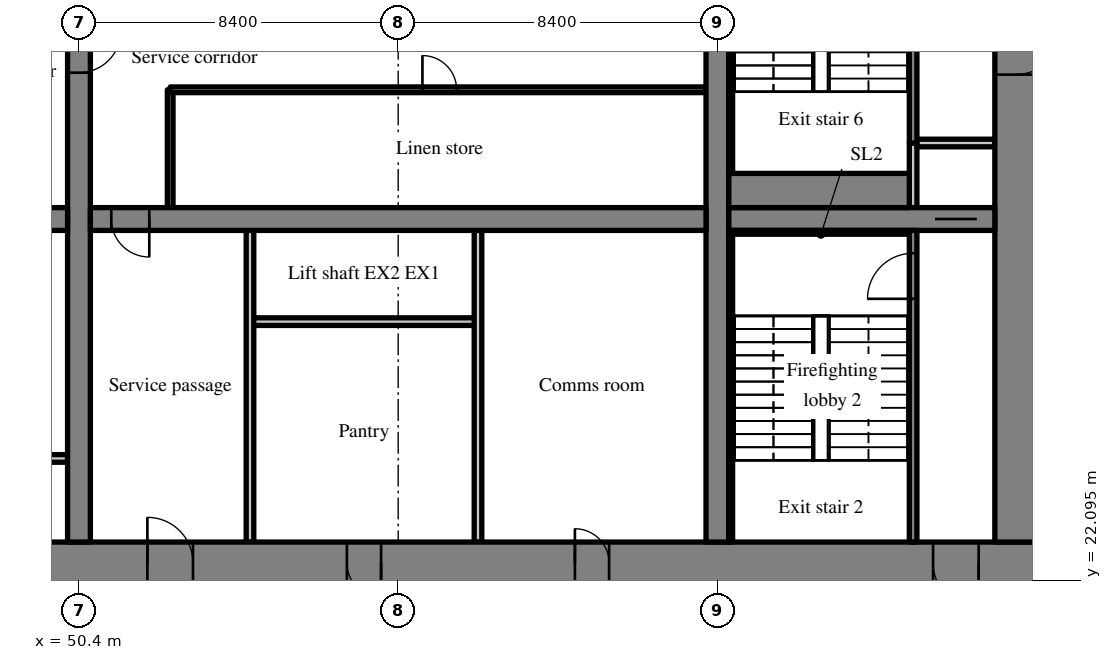
"""IFC4 building model, lengths in metres.
Left out: names, types, materials, properties, quantities, classifications, styles, units other than length and angle.
Written with IfcOpenShell. Run it as: python <this file> out.ifc"""

import sys

from ifc_helpers import new_model, si_unit, direction, frame, frame_2d, origin, place, context, subcontext, project, spatial, rectangle, extrude, source, transform, mapped, element, fill, save


model = new_model("IFC4")
c1 = context("Model", 3, precision=1e-05, world=origin(), true_north=direction((0.0, 1.0)))
c2 = subcontext(c1, "Body", "Model", "MODEL_VIEW")
j1 = project(units=[si_unit("LENGTHUNIT", "METRE"), si_unit("PLANEANGLEUNIT", "RADIAN")], contexts=[c1])
p1 = place(None, origin())
s1 = spatial("IfcSite", under=j1, at=p1, CompositionType="ELEMENT")
p2 = place(p1, origin())
s2 = spatial("IfcBuilding", under=s1, at=p2, CompositionType="ELEMENT")
p3 = place(p2, frame((0.0, 0.0, 31.6)))
s3 = spatial("IfcBuildingStorey", under=s2, at=p3, CompositionType="ELEMENT", Elevation=31.6)
m1 = source(origin(), c2, "Body", "SweptSolid", [
    extrude(rectangle(XDim=50.4, YDim=1.1, at=frame_2d((25.2, 0.0))), origin(), (0.0, 0.0, 1.0), 3.52),
])
p4 = place(p3, frame((25.2, 22.55, 0.0), z_axis=(0.0, 0.0, 1.0), x_axis=(1.0, 0.0, 0.0)))
e1 = element("IfcWall", 1, at=p4, inside=s3, PredefinedType="SHEAR", context=c2, shape_type="MappedRepresentation", body=[
    mapped(m1, transform((0.0, 0.0, 0.0), scale=1.0)),
])
m2 = source(origin(), c2, "Body", "SweptSolid", [
    extrude(rectangle(XDim=1.8, YDim=2.1, at=frame_2d((0.9, 1.05))), frame((0.0, 0.56, 0.0), z_axis=(0.0, -1.0, 0.0), x_axis=(1.0, 0.0, 0.0)), (0.0, 0.0, 1.0), 1.12),
])
p5 = place(p4, frame((15.9, 0.0, 0.0)))
e2 = element("IfcOpeningElement", 2, at=p5, cuts=e1, PredefinedType="OPENING", context=c2, shape_type="MappedRepresentation", body=[
    mapped(m2, transform((0.0, 0.0, 0.0), scale=1.0)),
])
m3 = source(origin(), c2, "Body", "SweptSolid", [
    extrude(rectangle(XDim=1.2, YDim=2.1, at=frame_2d((0.6, 1.05))), frame((0.0, 0.56, 0.0), z_axis=(0.0, -1.0, 0.0), x_axis=(1.0, 0.0, 0.0)), (0.0, 0.0, 1.0), 1.12),
])
p6 = place(p4, frame((27.0, 0.0, 0.0)))
e3 = element("IfcOpeningElement", 3, at=p6, cuts=e1, PredefinedType="OPENING", context=c2, shape_type="MappedRepresentation", body=[
    mapped(m3, transform((0.0, 0.0, 0.0), scale=1.0)),
])
m4 = source(origin(), c2, "Body", "SweptSolid", [
    extrude(rectangle(XDim=0.9, YDim=2.1, at=frame_2d((0.45, 1.05))), frame((0.0, 0.56, 0.0), z_axis=(0.0, -1.0, 0.0), x_axis=(1.0, 0.0, 0.0)), (0.0, 0.0, 1.0), 1.12),
])
p7 = place(p4, frame((32.25, 0.0, 0.0)))
e4 = element("IfcOpeningElement", 4, at=p7, cuts=e1, PredefinedType="OPENING", context=c2, shape_type="MappedRepresentation", body=[
    mapped(m4, transform((0.0, 0.0, 0.0), scale=1.0)),
])
p8 = place(p4, frame((38.25, 0.0, 0.0)))
e5 = element("IfcOpeningElement", 5, at=p8, cuts=e1, PredefinedType="OPENING", context=c2, shape_type="MappedRepresentation", body=[
    mapped(m4, transform((0.0, 0.0, 0.0), scale=1.0)),
])
p9 = place(p4, frame((6.425, 0.0, 0.0)))
e6 = element("IfcOpeningElement", 6, at=p9, cuts=e1, PredefinedType="OPENING", context=c2, shape_type="MappedRepresentation", body=[
    mapped(m3, transform((0.0, 0.0, 0.0), scale=1.0)),
])
p10 = place(p4, frame((47.675, 0.0, 0.0)))
e7 = element("IfcOpeningElement", 7, at=p10, cuts=e1, PredefinedType="OPENING", context=c2, shape_type="MappedRepresentation", body=[
    mapped(m3, transform((0.0, 0.0, 0.0), scale=1.0)),
])
m5 = source(origin(), c2, "Body", "SweptSolid", [
    extrude(rectangle(XDim=17.8, YDim=1.1, at=frame_2d((8.9, 0.0))), origin(), (0.0, 0.0, 1.0), 3.52),
])
p11 = place(p3, frame((75.05, 23.1, 0.0), z_axis=(0.0, 0.0, 1.0), x_axis=(0.0, 1.0, 0.0)))
e8 = element("IfcWall", 8, at=p11, inside=s3, PredefinedType="SHEAR", context=c2, shape_type="MappedRepresentation", body=[
    mapped(m5, transform((0.0, 0.0, 0.0), scale=1.0)),
])
p12 = place(p11, frame((12.3, 0.0, 0.0)))
e9 = element("IfcOpeningElement", 9, at=p12, cuts=e8, PredefinedType="OPENING", context=c2, shape_type="MappedRepresentation", body=[
    mapped(m3, transform((0.0, 0.0, 0.0), scale=1.0)),
])
m6 = source(origin(), c2, "Body", "SweptSolid", [
    extrude(rectangle(XDim=17.8, YDim=0.6, at=frame_2d((8.9, 0.0))), origin(), (0.0, 0.0, 1.0), 3.52),
])
p13 = place(p3, frame((50.4, 23.1, 0.0), z_axis=(0.0, 0.0, 1.0), x_axis=(0.0, 1.0, 0.0)))
e10 = element("IfcWall", 10, at=p13, inside=s3, PredefinedType="SHEAR", context=c2, shape_type="MappedRepresentation", body=[
    mapped(m6, transform((0.0, 0.0, 0.0), scale=1.0)),
])
m7 = source(origin(), c2, "Body", "SweptSolid", [
    extrude(rectangle(XDim=1.1, YDim=2.1, at=frame_2d((0.55, 1.05))), frame((0.0, 0.31, 0.0), z_axis=(0.0, -1.0, 0.0), x_axis=(1.0, 0.0, 0.0)), (0.0, 0.0, 1.0), 0.62),
])
p14 = place(p13, frame((12.35, 0.0, 0.0)))
e11 = element("IfcOpeningElement", 11, at=p14, cuts=e10, PredefinedType="OPENING", context=c2, shape_type="MappedRepresentation", body=[
    mapped(m7, transform((0.0, 0.0, 0.0), scale=1.0)),
])
p15 = place(p3, frame((67.2, 23.1, 0.0), z_axis=(0.0, 0.0, 1.0), x_axis=(0.0, 1.0, 0.0)))
e12 = element("IfcWall", 12, at=p15, inside=s3, PredefinedType="SHEAR", context=c2, shape_type="MappedRepresentation", body=[
    mapped(m6, transform((0.0, 0.0, 0.0), scale=1.0)),
])
m8 = source(origin(), c2, "Body", "SweptSolid", [
    extrude(rectangle(XDim=16.2, YDim=0.6, at=frame_2d((8.1, 0.0))), origin(), (0.0, 0.0, 1.0), 3.52),
])
p16 = place(p3, frame((33.9, 31.6, 0.0), z_axis=(0.0, 0.0, 1.0), x_axis=(1.0, 0.0, 0.0)))
e13 = element("IfcWall", 13, at=p16, inside=s3, PredefinedType="SHEAR", context=c2, shape_type="MappedRepresentation", body=[
    mapped(m8, transform((0.0, 0.0, 0.0), scale=1.0)),
])
m9 = source(origin(), c2, "Body", "SweptSolid", [
    extrude(rectangle(XDim=1.0, YDim=2.1, at=frame_2d((0.5, 1.05))), frame((0.0, 0.31, 0.0), z_axis=(0.0, -1.0, 0.0), x_axis=(1.0, 0.0, 0.0)), (0.0, 0.0, 1.0), 0.62),
])
p17 = place(p16, frame((14.65, 0.0, 0.0)))
e14 = element("IfcOpeningElement", 14, at=p17, cuts=e13, PredefinedType="OPENING", context=c2, shape_type="MappedRepresentation", body=[
    mapped(m9, transform((0.0, 0.0, 0.0), scale=1.0)),
])
m10 = source(origin(), c2, "Body", "SweptSolid", [
    extrude(rectangle(XDim=16.2, YDim=0.6, at=frame_2d((8.1, 0.0))), origin(), (0.0, 0.0, 1.0), 3.52),
])
p18 = place(p3, frame((50.7, 31.6, 0.0), z_axis=(0.0, 0.0, 1.0), x_axis=(1.0, 0.0, 0.0)))
e15 = element("IfcWall", 15, at=p18, inside=s3, PredefinedType="SHEAR", context=c2, shape_type="MappedRepresentation", body=[
    mapped(m10, transform((0.0, 0.0, 0.0), scale=1.0)),
])
p19 = place(p18, frame((0.55, 0.0, 0.0)))
e16 = element("IfcOpeningElement", 16, at=p19, cuts=e15, PredefinedType="OPENING", context=c2, shape_type="MappedRepresentation", body=[
    mapped(m9, transform((0.0, 0.0, 0.0), scale=1.0)),
])
m11 = source(origin(), c2, "Body", "SweptSolid", [
    extrude(rectangle(XDim=7.0, YDim=0.6, at=frame_2d((3.5, 0.0))), origin(), (0.0, 0.0, 1.0), 3.52),
])
p20 = place(p3, frame((67.5, 31.6, 0.0), z_axis=(0.0, 0.0, 1.0), x_axis=(1.0, 0.0, 0.0)))
e17 = element("IfcWall", 17, at=p20, inside=s3, PredefinedType="SHEAR", context=c2, shape_type="MappedRepresentation", body=[
    mapped(m11, transform((0.0, 0.0, 0.0), scale=1.0)),
])
p21 = place(p20, frame((5.425, 0.0, 0.0)))
e18 = element("IfcOpeningElement", 18, at=p21, cuts=e17, PredefinedType="OPENING", context=c2, shape_type="MappedRepresentation", body=[
    mapped(m7, transform((0.0, 0.0, 0.0), scale=1.0)),
])
m12 = source(origin(), c2, "Body", "SweptSolid", [
    extrude(rectangle(XDim=6.0, YDim=0.2, at=frame_2d((3.0, 0.0))), origin(), (0.0, 0.0, 1.0), 3.52),
])
p22 = place(p3, frame((44.1, 25.3, 0.0), z_axis=(0.0, 0.0, 1.0), x_axis=(1.0, 0.0, 0.0)))
e19 = element("IfcWall", 19, at=p22, inside=s3, PredefinedType="SOLIDWALL", context=c2, shape_type="MappedRepresentation", body=[
    mapped(m12, transform((0.0, 0.0, 0.0), scale=1.0)),
])
m13 = source(origin(), c2, "Body", "SweptSolid", [
    extrude(rectangle(XDim=1.1, YDim=2.1, at=frame_2d((0.55, 1.05))), frame((0.0, 0.11, 0.0), z_axis=(0.0, -1.0, 0.0), x_axis=(1.0, 0.0, 0.0)), (0.0, 0.0, 1.0), 0.22),
])
p23 = place(p22, frame((0.95, 0.0, 0.0)))
e20 = element("IfcOpeningElement", 20, at=p23, cuts=e19, PredefinedType="OPENING", context=c2, shape_type="MappedRepresentation", body=[
    mapped(m13, transform((0.0, 0.0, 0.0), scale=1.0)),
])
p24 = place(p22, frame((3.95, 0.0, 0.0)))
e21 = element("IfcOpeningElement", 21, at=p24, cuts=e19, PredefinedType="OPENING", context=c2, shape_type="MappedRepresentation", body=[
    mapped(m13, transform((0.0, 0.0, 0.0), scale=1.0)),
])
p25 = place(p3, frame((60.9, 28.9, 0.0), z_axis=(0.0, 0.0, 1.0), x_axis=(-1.0, 0.0, 0.0)))
e22 = element("IfcWall", 22, at=p25, inside=s3, PredefinedType="SOLIDWALL", context=c2, shape_type="MappedRepresentation", body=[
    mapped(m12, transform((0.0, 0.0, 0.0), scale=1.0)),
])
m14 = source(origin(), c2, "Body", "SweptSolid", [
    extrude(rectangle(XDim=8.2, YDim=0.2, at=frame_2d((4.1, 0.0))), origin(), (0.0, 0.0, 1.0), 3.52),
])
for number, where, z_axis, x_axis in (
    (23, (54.9, 23.1, 0.0), (0.0, 0.0, 1.0), (0.0, 1.0, 0.0)),
    (24, (60.9, 23.1, 0.0), (0.0, 0.0, 1.0), (0.0, 1.0, 0.0)),
):
    element("IfcWall", number, at=place(p3, frame(where, z_axis=z_axis, x_axis=x_axis)), inside=s3, PredefinedType="PARTITIONING", context=c2, shape_type="MappedRepresentation", body=[
        mapped(m14, transform((0.0, 0.0, 0.0), scale=1.0)),
    ])
m15 = source(origin(), c2, "Body", "SweptSolid", [
    extrude(rectangle(XDim=3.1, YDim=0.15, at=frame_2d((1.55, 0.0))), origin(), (0.0, 0.0, 1.0), 3.52),
])
p26 = place(p3, frame((52.8, 31.9, 0.0), z_axis=(0.0, 0.0, 1.0), x_axis=(0.0, 1.0, 0.0)))
e25 = element("IfcWall", 25, at=p26, inside=s3, PredefinedType="PARTITIONING", context=c2, shape_type="MappedRepresentation", body=[
    mapped(m15, transform((0.0, 0.0, 0.0), scale=1.0)),
])
m16 = source(origin(), c2, "Body", "SweptSolid", [
    extrude(rectangle(XDim=14.1, YDim=0.15, at=frame_2d((7.05, 0.0))), origin(), (0.0, 0.0, 1.0), 3.52),
])
p27 = place(p3, frame((66.9, 35.0, 0.0), z_axis=(0.0, 0.0, 1.0), x_axis=(-1.0, 0.0, 0.0)))
e26 = element("IfcWall", 26, at=p27, inside=s3, PredefinedType="PARTITIONING", context=c2, shape_type="MappedRepresentation", body=[
    mapped(m16, transform((0.0, 0.0, 0.0), scale=1.0)),
])
m17 = source(origin(), c2, "Body", "SweptSolid", [
    extrude(rectangle(XDim=0.9, YDim=2.1, at=frame_2d((0.45, 1.05))), frame((0.0, 0.085, 0.0), z_axis=(0.0, -1.0, 0.0), x_axis=(1.0, 0.0, 0.0)), (0.0, 0.0, 1.0), 0.17),
])
p28 = place(p27, frame((6.562, 0.0, 0.0)))
e27 = element("IfcOpeningElement", 27, at=p28, cuts=e26, PredefinedType="OPENING", context=c2, shape_type="MappedRepresentation", body=[
    mapped(m17, transform((0.0, 0.0, 0.0), scale=1.0)),
])
m18 = source(origin(), c2, "Body", "SweptSolid", [
    extrude(rectangle(XDim=8.2, YDim=0.2, at=frame_2d((4.1, 0.0))), origin(), (0.0, 0.0, 1.0), 3.52),
])
p29 = place(p3, frame((72.35, 23.1, 0.0), z_axis=(0.0, 0.0, 1.0), x_axis=(0.0, 1.0, 0.0)))
e28 = element("IfcWall", 28, at=p29, inside=s3, PredefinedType="SOLIDWALL", context=c2, shape_type="MappedRepresentation", body=[
    mapped(m18, transform((0.0, 0.0, 0.0), scale=1.0)),
])
m19 = source(origin(), c2, "Body", "SweptSolid", [
    extrude(rectangle(XDim=1.2, YDim=2.1, at=frame_2d((0.6, 1.05))), frame((0.0, 0.11, 0.0), z_axis=(0.0, -1.0, 0.0), x_axis=(1.0, 0.0, 0.0)), (0.0, 0.0, 1.0), 0.22),
])
p30 = place(p29, frame((6.4, 0.0, 0.0)))
e29 = element("IfcOpeningElement", 29, at=p30, cuts=e28, PredefinedType="OPENING", context=c2, shape_type="MappedRepresentation", body=[
    mapped(m19, transform((0.0, 0.0, 0.0), scale=1.0)),
])
m20 = source(origin(), c2, "Body", "SweptSolid", [
    extrude(rectangle(XDim=1.7, YDim=0.2, at=frame_2d((0.85, 0.0))), origin(), (0.0, 0.0, 1.0), 3.52),
])
p31 = place(p3, frame((72.35, 31.9, 0.0), z_axis=(0.0, 0.0, 1.0), x_axis=(0.0, 1.0, 0.0)))
e30 = element("IfcWall", 30, at=p31, inside=s3, PredefinedType="SOLIDWALL", context=c2, shape_type="MappedRepresentation", body=[
    mapped(m20, transform((0.0, 0.0, 0.0), scale=1.0)),
])
m21 = source(origin(), c2, "Body", "SweptSolid", [
    extrude(rectangle(XDim=2.05, YDim=0.2, at=frame_2d((1.025, 0.0))), origin(), (0.0, 0.0, 1.0), 3.52),
])
p32 = place(p3, frame((72.45, 33.6, 0.0), z_axis=(0.0, 0.0, 1.0), x_axis=(1.0, 0.0, 0.0)))
e31 = element("IfcWall", 31, at=p32, inside=s3, PredefinedType="SOLIDWALL", context=c2, shape_type="MappedRepresentation", body=[
    mapped(m21, transform((0.0, 0.0, 0.0), scale=1.0)),
])
m22 = source(origin(), c2, "Body", "SweptSolid", [
    extrude(rectangle(XDim=7.3, YDim=0.2, at=frame_2d((3.65, 0.0))), origin(), (0.0, 0.0, 1.0), 3.52),
])
p33 = place(p3, frame((72.35, 33.6, 0.0), z_axis=(0.0, 0.0, 1.0), x_axis=(0.0, 1.0, 0.0)))
e32 = element("IfcWall", 32, at=p33, inside=s3, PredefinedType="SOLIDWALL", context=c2, shape_type="MappedRepresentation", body=[
    mapped(m22, transform((0.0, 0.0, 0.0), scale=1.0)),
])
m23 = source(origin(), c2, "Body", "SweptSolid", [
    extrude(rectangle(XDim=1.8, YDim=2.1, at=frame_2d((0.9, 1.05))), frame((0.0, 0.11, 0.0), z_axis=(0.0, -1.0, 0.0), x_axis=(1.0, 0.0, 0.0)), (0.0, 0.0, 1.0), 0.22),
])
p34 = place(p33, frame((5.3, 0.0, 0.0)))
e33 = element("IfcOpeningElement", 33, at=p34, cuts=e32, PredefinedType="OPENING", context=c2, shape_type="MappedRepresentation", body=[
    mapped(m23, transform((0.0, 0.0, 0.0), scale=1.0)),
])
m24 = source(origin(), c2, "Body", "SweptSolid", [
    extrude(rectangle(XDim=4.75, YDim=0.1, at=frame_2d((2.375, 0.0))), origin(), (0.0, 0.0, 1.0), 3.52),
])
p35 = place(p3, frame((67.5, 31.25, 0.0), z_axis=(0.0, 0.0, 1.0), x_axis=(1.0, 0.0, 0.0)))
e34 = element("IfcWall", 34, at=p35, inside=s3, PredefinedType="SOLIDWALL", context=c2, shape_type="MappedRepresentation", body=[
    mapped(m24, transform((0.0, 0.0, 0.0), scale=1.0)),
])
m25 = source(origin(), c2, "Body", "SweptSolid", [
    extrude(rectangle(XDim=8.1, YDim=0.1, at=frame_2d((4.05, 0.0))), origin(), (0.0, 0.0, 1.0), 3.52),
])
p36 = place(p3, frame((67.55, 23.1, 0.0), z_axis=(0.0, 0.0, 1.0), x_axis=(0.0, 1.0, 0.0)))
e35 = element("IfcWall", 35, at=p36, inside=s3, PredefinedType="SOLIDWALL", context=c2, shape_type="MappedRepresentation", body=[
    mapped(m25, transform((0.0, 0.0, 0.0), scale=1.0)),
])
m26 = source(origin(), c2, "Body", "SweptSolid", [
    extrude(rectangle(XDim=4.75, YDim=0.9, at=frame_2d((2.375, 0.0))), origin(), (0.0, 0.0, 1.0), 3.52),
])
p37 = place(p3, frame((67.5, 32.35, 0.0), z_axis=(0.0, 0.0, 1.0), x_axis=(1.0, 0.0, 0.0)))
e36 = element("IfcWall", 36, at=p37, inside=s3, PredefinedType="SOLIDWALL", context=c2, shape_type="MappedRepresentation", body=[
    mapped(m26, transform((0.0, 0.0, 0.0), scale=1.0)),
])
p38 = place(p3, frame((67.55, 32.8, 0.0), z_axis=(0.0, 0.0, 1.0), x_axis=(0.0, 1.0, 0.0)))
e37 = element("IfcWall", 37, at=p38, inside=s3, PredefinedType="SOLIDWALL", context=c2, shape_type="MappedRepresentation", body=[
    mapped(m25, transform((0.0, 0.0, 0.0), scale=1.0)),
])
m27 = source(origin(), c2, "Body", "SweptSolid", [
    extrude(rectangle(XDim=1.2, YDim=2.1, at=frame_2d((0.6, 1.05))), frame((0.0, 0.325, 0.0), z_axis=(0.0, -1.0, 0.0), x_axis=(1.0, 0.0, 0.0)), (0.0, 0.0, 1.0), 0.05),
])
p39 = place(p6, origin())
e38 = element("IfcDoor", 38, at=p39, inside=s3, OperationType="SINGLE_SWING_LEFT", PredefinedType="DOOR", context=c2, shape_type="MappedRepresentation", body=[
    mapped(m27, transform((0.0, 0.0, 0.0), scale=1.0)),
])
fill(e3, e38)
m28 = source(origin(), c2, "Body", "SweptSolid", [
    extrude(rectangle(XDim=1.0, YDim=2.1, at=frame_2d((0.5, 1.05))), frame((0.0, 0.025, 0.0), z_axis=(0.0, -1.0, 0.0), x_axis=(1.0, 0.0, 0.0)), (0.0, 0.0, 1.0), 0.05),
])
p40 = place(p19, origin())
e39 = element("IfcDoor", 39, at=p40, inside=s3, OperationType="SINGLE_SWING_RIGHT", PredefinedType="DOOR", context=c2, shape_type="MappedRepresentation", body=[
    mapped(m28, transform((0.0, 0.0, 0.0), scale=1.0)),
])
fill(e16, e39)
m29 = source(origin(), c2, "Body", "SweptSolid", [
    extrude(rectangle(XDim=0.9, YDim=2.1, at=frame_2d((0.45, 1.05))), frame((0.0, 0.325, 0.0), z_axis=(0.0, -1.0, 0.0), x_axis=(1.0, 0.0, 0.0)), (0.0, 0.0, 1.0), 0.05),
])
p41 = place(p7, origin())
e40 = element("IfcDoor", 40, at=p41, inside=s3, OperationType="SINGLE_SWING_RIGHT", PredefinedType="DOOR", context=c2, shape_type="MappedRepresentation", body=[
    mapped(m29, transform((0.0, 0.0, 0.0), scale=1.0)),
])
fill(e4, e40)
p42 = place(p8, origin())
e41 = element("IfcDoor", 41, at=p42, inside=s3, OperationType="SINGLE_SWING_LEFT", PredefinedType="DOOR", context=c2, shape_type="MappedRepresentation", body=[
    mapped(m29, transform((0.0, 0.0, 0.0), scale=1.0)),
])
fill(e5, e41)
m30 = source(origin(), c2, "Body", "SweptSolid", [
    extrude(rectangle(XDim=0.9, YDim=2.1, at=frame_2d((0.45, 1.05))), frame((0.0, 0.025, 0.0), z_axis=(0.0, -1.0, 0.0), x_axis=(1.0, 0.0, 0.0)), (0.0, 0.0, 1.0), 0.05),
])
p43 = place(p28, origin())
e42 = element("IfcDoor", 42, at=p43, inside=s3, OperationType="SINGLE_SWING_RIGHT", PredefinedType="DOOR", context=c2, shape_type="MappedRepresentation", body=[
    mapped(m30, transform((0.0, 0.0, 0.0), scale=1.0)),
])
fill(e27, e42)
m31 = source(origin(), c2, "Body", "SweptSolid", [
    extrude(rectangle(XDim=1.2, YDim=2.1, at=frame_2d((0.6, 1.05))), frame((0.0, 0.025, 0.0), z_axis=(0.0, -1.0, 0.0), x_axis=(1.0, 0.0, 0.0)), (0.0, 0.0, 1.0), 0.05),
])
p44 = place(p30, origin())
e43 = element("IfcDoor", 43, at=p44, inside=s3, OperationType="SINGLE_SWING_LEFT", PredefinedType="DOOR", context=c2, shape_type="MappedRepresentation", body=[
    mapped(m31, transform((0.0, 0.0, 0.0), scale=1.0)),
])
fill(e29, e43)
p45 = place(p10, origin())
e44 = element("IfcDoor", 44, at=p45, inside=s3, OperationType="SINGLE_SWING_RIGHT", PredefinedType="DOOR", context=c2, shape_type="MappedRepresentation", body=[
    mapped(m27, transform((0.0, 0.0, 0.0), scale=1.0)),
])
fill(e7, e44)
m32 = source(origin(), c2, "Body", "SweptSolid", [
    extrude(rectangle(XDim=1.1, YDim=2.1, at=frame_2d((0.55, 1.05))), frame((0.0, 0.025, 0.0), z_axis=(0.0, -1.0, 0.0), x_axis=(1.0, 0.0, 0.0)), (0.0, 0.0, 1.0), 0.05),
])
p46 = place(p21, origin())
e45 = element("IfcDoor", 45, at=p46, inside=s3, OperationType="SLIDING_TO_RIGHT", PredefinedType="DOOR", context=c2, shape_type="MappedRepresentation", body=[
    mapped(m32, transform((0.0, 0.0, 0.0), scale=1.0)),
])
fill(e18, e45)
p47 = place(p12, origin())
e46 = element("IfcDoor", 46, at=p47, inside=s3, OperationType="SINGLE_SWING_RIGHT", PredefinedType="DOOR", context=c2, shape_type="MappedRepresentation", body=[
    mapped(m31, transform((0.0, 0.0, 0.0), scale=1.0)),
])
fill(e9, e46)
p48 = place(p14, origin())
e47 = element("IfcDoor", 47, at=p48, inside=s3, OperationType="SINGLE_SWING_RIGHT", PredefinedType="DOOR", context=c2, shape_type="MappedRepresentation", body=[
    mapped(m32, transform((0.0, 0.0, 0.0), scale=1.0)),
])
fill(e11, e47)
save(model, sys.argv[1])
